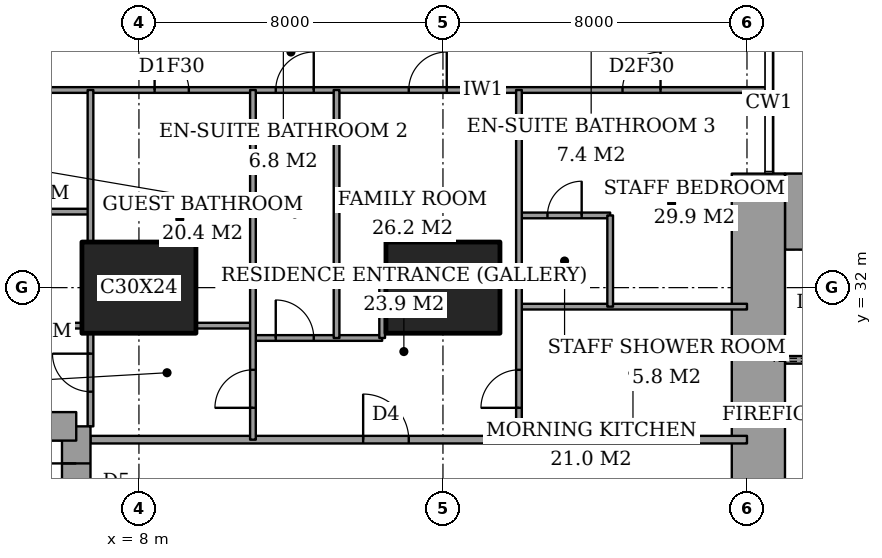
"""IFC4 building model, lengths in metres.
Left out: names, types, materials, properties, quantities, classifications, styles, units other than length and angle.
Written with IfcOpenShell. Run it as: python <this file> out.ifc"""

import sys

from ifc_helpers import new_model, si_unit, direction, frame, frame_2d, origin, origin_2d, place, context, subcontext, project, spatial, rectangle, extrude, element, fill, save


model = new_model("IFC4")
c1 = context("Model", 3, precision=1e-05, world=origin(), true_north=direction((0.0, 1.0)))
c2 = subcontext(c1, "Body", "Model", "MODEL_VIEW")
j1 = project(units=[si_unit("LENGTHUNIT", "METRE"), si_unit("PLANEANGLEUNIT", "RADIAN")], contexts=[c1])
p1 = place(None, origin())
s1 = spatial("IfcSite", under=j1, at=p1, CompositionType="ELEMENT")
p2 = place(p1, origin())
s2 = spatial("IfcBuilding", under=s1, at=p2, CompositionType="ELEMENT")
p3 = place(p2, frame((0.0, 0.0, 125.0)))
s3 = spatial("IfcBuildingStorey", under=s2, at=p3, CompositionType="ELEMENT", Elevation=125.0)
for number, where, z_axis, x_axis in (
    (1, (8.0, 32.0, 0.0), (0.0, 0.0, 1.0), (1.0, 0.0, 0.0)),
    (2, (16.0, 32.0, 0.0), (0.0, 0.0, 1.0), (1.0, 0.0, 0.0)),
):
    element("IfcColumn", number, at=place(p3, frame(where, z_axis=z_axis, x_axis=x_axis)), inside=s3, PredefinedType="COLUMN", context=c2, shape_type="SweptSolid", body=[
        extrude(rectangle(XDim=3.0, YDim=2.4, at=origin_2d()), origin(), (0.0, 0.0, 1.0), 3.6),
    ])
p4 = place(p3, frame((25.0, 34.0, 0.0), z_axis=(0.0, 0.0, 1.0), x_axis=(1.0, 0.0, 0.0)))
e3 = element("IfcWall", 3, at=p4, inside=s3, PredefinedType="SHEAR", context=c2, shape_type="SweptSolid", body=[
    extrude(rectangle(XDim=3.15, YDim=2.0, at=frame_2d((1.575, 0.0))), origin(), (0.0, 0.0, 1.0), 3.6),
])
p5 = place(p3, frame((24.3, 23.15, 0.0), z_axis=(0.0, 0.0, 1.0), x_axis=(0.0, 1.0, 0.0)))
e4 = element("IfcWall", 4, at=p5, inside=s3, PredefinedType="SHEAR", context=c2, shape_type="SweptSolid", body=[
    extrude(rectangle(XDim=11.85, YDim=1.4, at=frame_2d((5.925, 0.0))), origin(), (0.0, 0.0, 1.0), 3.6),
])
p6 = place(p5, frame((0.75, 0.0, 0.0)))
e5 = element("IfcOpeningElement", 5, at=p6, cuts=e4, PredefinedType="OPENING", context=c2, shape_type="SweptSolid", body=[
    extrude(rectangle(XDim=1.8, YDim=2.4, at=frame_2d((0.9, 1.2))), frame((0.0, 0.71, 0.0), z_axis=(0.0, -1.0, 0.0), x_axis=(1.0, 0.0, 0.0)), (0.0, 0.0, 1.0), 1.42),
])
p7 = place(p3, frame((6.35, 19.65, 0.0), z_axis=(0.0, 0.0, 1.0), x_axis=(0.0, 1.0, 0.0)))
e6 = element("IfcWall", 6, at=p7, inside=s3, PredefinedType="SHEAR", context=c2, shape_type="SweptSolid", body=[
    extrude(rectangle(XDim=8.7, YDim=0.75, at=frame_2d((4.35, 0.0))), origin(), (0.0, 0.0, 1.0), 3.6),
])
p8 = place(p7, frame((6.725, 0.0, 0.0)))
e7 = element("IfcOpeningElement", 7, at=p8, cuts=e6, PredefinedType="OPENING", context=c2, shape_type="SweptSolid", body=[
    extrude(rectangle(XDim=1.0, YDim=2.1, at=frame_2d((0.5, 1.05))), frame((0.0, 0.385, 0.0), z_axis=(0.0, -1.0, 0.0), x_axis=(1.0, 0.0, 0.0)), (0.0, 0.0, 1.0), 0.77),
])
p9 = place(p3, frame((6.35, 28.35, 0.0), z_axis=(0.0, 0.0, 1.0), x_axis=(-1.0, 0.0, 0.0)))
e8 = element("IfcWall", 8, at=p9, inside=s3, PredefinedType="SHEAR", context=c2, shape_type="SweptSolid", body=[
    extrude(rectangle(XDim=4.45, YDim=0.75, at=frame_2d((2.225, 0.0))), origin(), (0.0, 0.0, 1.0), 3.6),
])
p10 = place(p3, frame((6.725, 28.0, 0.0), z_axis=(0.0, 0.0, 1.0), x_axis=(1.0, 0.0, 0.0)))
e9 = element("IfcWall", 9, at=p10, inside=s3, PredefinedType="PARTITIONING", context=c2, shape_type="SweptSolid", body=[
    extrude(rectangle(XDim=17.275, YDim=0.2, at=frame_2d((8.637, 0.0))), origin(), (0.0, 0.0, 1.0), 3.35),
])
p11 = place(p10, frame((7.175, 0.0, 0.0)))
e10 = element("IfcOpeningElement", 10, at=p11, cuts=e9, PredefinedType="OPENING", context=c2, shape_type="SweptSolid", body=[
    extrude(rectangle(XDim=1.2, YDim=2.4, at=frame_2d((0.6, 1.2))), frame((0.0, 0.11, 0.0), z_axis=(0.0, -1.0, 0.0), x_axis=(1.0, 0.0, 0.0)), (0.0, 0.0, 1.0), 0.22),
])
p12 = place(p3, frame((11.0, 30.675, 0.0), z_axis=(0.0, 0.0, 1.0), x_axis=(1.0, 0.0, 0.0)))
e11 = element("IfcWall", 11, at=p12, inside=s3, PredefinedType="PARTITIONING", context=c2, shape_type="SweptSolid", body=[
    extrude(rectangle(XDim=3.4, YDim=0.15, at=frame_2d((1.7, 0.0))), origin(), (0.0, 0.0, 1.0), 3.35),
])
p13 = place(p12, frame((0.6, 0.0, 0.0)))
e12 = element("IfcOpeningElement", 12, at=p13, cuts=e11, PredefinedType="OPENING", context=c2, shape_type="SweptSolid", body=[
    extrude(rectangle(XDim=1.0, YDim=2.1, at=frame_2d((0.5, 1.05))), frame((0.0, 0.085, 0.0), z_axis=(0.0, -1.0, 0.0), x_axis=(1.0, 0.0, 0.0)), (0.0, 0.0, 1.0), 0.17),
])
p14 = place(p3, frame((1.35, 31.0, 0.0), z_axis=(0.0, 0.0, 1.0), x_axis=(1.0, 0.0, 0.0)))
e13 = element("IfcWall", 13, at=p14, inside=s3, PredefinedType="PARTITIONING", context=c2, shape_type="SweptSolid", body=[
    extrude(rectangle(XDim=5.15, YDim=0.15, at=frame_2d((2.575, 0.0))), origin(), (0.0, 0.0, 1.0), 3.35),
])
p15 = place(p3, frame((9.5, 31.0, 0.0), z_axis=(0.0, 0.0, 1.0), x_axis=(1.0, 0.0, 0.0)))
e14 = element("IfcWall", 14, at=p15, inside=s3, PredefinedType="PARTITIONING", context=c2, shape_type="SweptSolid", body=[
    extrude(rectangle(XDim=1.5, YDim=0.15, at=frame_2d((0.75, 0.0))), origin(), (0.0, 0.0, 1.0), 3.35),
])
p16 = place(p3, frame((18.0, 31.5, 0.0), z_axis=(0.0, 0.0, 1.0), x_axis=(1.0, 0.0, 0.0)))
e15 = element("IfcWall", 15, at=p16, inside=s3, PredefinedType="PARTITIONING", context=c2, shape_type="SweptSolid", body=[
    extrude(rectangle(XDim=6.0, YDim=0.15, at=frame_2d((3.0, 0.0))), origin(), (0.0, 0.0, 1.0), 3.35),
])
p17 = place(p3, frame((17.5, 32.1, 0.0), z_axis=(0.0, 0.0, 1.0), x_axis=(1.0, 0.0, 0.0)))
e16 = element("IfcWall", 16, at=p17, inside=s3, PredefinedType="PARTITIONING", context=c2, shape_type="SweptSolid", body=[
    extrude(rectangle(XDim=0.5, YDim=0.15, at=frame_2d((0.25, 0.0))), origin(), (0.0, 0.0, 1.0), 2.634),
])
p18 = place(p3, frame((18.0, 33.9, 0.0), z_axis=(0.0, 0.0, 1.0), x_axis=(1.0, 0.0, 0.0)))
e17 = element("IfcWall", 17, at=p18, inside=s3, PredefinedType="PARTITIONING", context=c2, shape_type="SweptSolid", body=[
    extrude(rectangle(XDim=2.4, YDim=0.15, at=frame_2d((1.2, 0.0))), origin(), (0.0, 0.0, 1.0), 3.35),
])
p19 = place(p18, frame((0.75, 0.0, 0.0)))
e18 = element("IfcOpeningElement", 18, at=p19, cuts=e17, PredefinedType="OPENING", context=c2, shape_type="SweptSolid", body=[
    extrude(rectangle(XDim=0.9, YDim=2.1, at=frame_2d((0.45, 1.05))), frame((0.0, 0.085, 0.0), z_axis=(0.0, -1.0, 0.0), x_axis=(1.0, 0.0, 0.0)), (0.0, 0.0, 1.0), 0.17),
])
p20 = place(p3, frame((4.125, 34.0, 0.0), z_axis=(0.0, 0.0, 1.0), x_axis=(1.0, 0.0, 0.0)))
e19 = element("IfcWall", 19, at=p20, inside=s3, PredefinedType="PARTITIONING", context=c2, shape_type="SweptSolid", body=[
    extrude(rectangle(XDim=2.6, YDim=0.15, at=frame_2d((1.3, 0.0))), origin(), (0.0, 0.0, 1.0), 3.35),
])
p21 = place(p3, frame((-0.45, 37.2, 0.0), z_axis=(0.0, 0.0, 1.0), x_axis=(1.0, 0.0, 0.0)))
e20 = element("IfcWall", 20, at=p21, inside=s3, PredefinedType="PARTITIONING", context=c2, shape_type="SweptSolid", body=[
    extrude(rectangle(XDim=25.011, YDim=0.15, at=frame_2d((12.505, 0.0))), origin(), (0.0, 0.0, 1.0), 3.35),
])
p22 = place(p21, frame((12.05, 0.0, 0.0)))
e21 = element("IfcOpeningElement", 21, at=p22, cuts=e20, PredefinedType="OPENING", context=c2, shape_type="SweptSolid", body=[
    extrude(rectangle(XDim=1.0, YDim=2.1, at=frame_2d((0.5, 1.05))), frame((0.0, 0.085, 0.0), z_axis=(0.0, -1.0, 0.0), x_axis=(1.0, 0.0, 0.0)), (0.0, 0.0, 1.0), 0.17),
])
p23 = place(p21, frame((3.087, 0.0, 0.0)))
e22 = element("IfcOpeningElement", 22, at=p23, cuts=e20, PredefinedType="OPENING", context=c2, shape_type="SweptSolid", body=[
    extrude(rectangle(XDim=1.0, YDim=2.1, at=frame_2d((0.5, 1.05))), frame((0.0, 0.085, 0.0), z_axis=(0.0, -1.0, 0.0), x_axis=(1.0, 0.0, 0.0)), (0.0, 0.0, 1.0), 0.17),
])
p24 = place(p21, frame((8.863, 0.0, 0.0)))
e23 = element("IfcOpeningElement", 23, at=p24, cuts=e20, PredefinedType="OPENING", context=c2, shape_type="SweptSolid", body=[
    extrude(rectangle(XDim=0.9, YDim=2.1, at=frame_2d((0.45, 1.05))), frame((0.0, 0.085, 0.0), z_axis=(0.0, -1.0, 0.0), x_axis=(1.0, 0.0, 0.0)), (0.0, 0.0, 1.0), 0.17),
])
p25 = place(p21, frame((15.55, 0.0, 0.0)))
e24 = element("IfcOpeningElement", 24, at=p25, cuts=e20, PredefinedType="OPENING", context=c2, shape_type="SweptSolid", body=[
    extrude(rectangle(XDim=1.0, YDim=2.1, at=frame_2d((0.5, 1.05))), frame((0.0, 0.085, 0.0), z_axis=(0.0, -1.0, 0.0), x_axis=(1.0, 0.0, 0.0)), (0.0, 0.0, 1.0), 0.17),
])
p26 = place(p21, frame((21.175, 0.0, 0.0)))
e25 = element("IfcOpeningElement", 25, at=p26, cuts=e20, PredefinedType="OPENING", context=c2, shape_type="SweptSolid", body=[
    extrude(rectangle(XDim=1.0, YDim=2.1, at=frame_2d((0.5, 1.05))), frame((0.0, 0.085, 0.0), z_axis=(0.0, -1.0, 0.0), x_axis=(1.0, 0.0, 0.0)), (0.0, 0.0, 1.0), 0.17),
])
p27 = place(p3, frame((6.725, 28.35, 0.0), z_axis=(0.0, 0.0, 1.0), x_axis=(0.0, 1.0, 0.0)))
e26 = element("IfcWall", 26, at=p27, inside=s3, PredefinedType="PARTITIONING", context=c2, shape_type="SweptSolid", body=[
    extrude(rectangle(XDim=2.45, YDim=0.15, at=frame_2d((1.225, 0.0))), origin(), (0.0, 0.0, 1.0), 3.35),
])
p28 = place(p27, frame((0.913, 0.0, 0.0)))
e27 = element("IfcOpeningElement", 27, at=p28, cuts=e26, PredefinedType="OPENING", context=c2, shape_type="SweptSolid", body=[
    extrude(rectangle(XDim=1.0, YDim=2.1, at=frame_2d((0.5, 1.05))), frame((0.0, 0.085, 0.0), z_axis=(0.0, -1.0, 0.0), x_axis=(1.0, 0.0, 0.0)), (0.0, 0.0, 1.0), 0.17),
])
p29 = place(p3, frame((6.725, 33.2, 0.0), z_axis=(0.0, 0.0, 1.0), x_axis=(0.0, 1.0, 0.0)))
e28 = element("IfcWall", 28, at=p29, inside=s3, PredefinedType="PARTITIONING", context=c2, shape_type="SweptSolid", body=[
    extrude(rectangle(XDim=4.0, YDim=0.15, at=frame_2d((2.0, 0.0))), origin(), (0.0, 0.0, 1.0), 3.35),
])
p30 = place(p3, frame((11.0, 28.0, 0.0), z_axis=(0.0, 0.0, 1.0), x_axis=(0.0, 1.0, 0.0)))
e29 = element("IfcWall", 29, at=p30, inside=s3, PredefinedType="PARTITIONING", context=c2, shape_type="SweptSolid", body=[
    extrude(rectangle(XDim=9.2, YDim=0.15, at=frame_2d((4.6, 0.0))), origin(), (0.0, 0.0, 1.0), 3.35),
])
p31 = place(p30, frame((0.837, 0.0, 0.0)))
e30 = element("IfcOpeningElement", 30, at=p31, cuts=e29, PredefinedType="OPENING", context=c2, shape_type="SweptSolid", body=[
    extrude(rectangle(XDim=1.0, YDim=2.1, at=frame_2d((0.5, 1.05))), frame((0.0, 0.085, 0.0), z_axis=(0.0, -1.0, 0.0), x_axis=(1.0, 0.0, 0.0)), (0.0, 0.0, 1.0), 0.17),
])
p32 = place(p3, frame((13.2, 30.675, 0.0), z_axis=(0.0, 0.0, 1.0), x_axis=(0.0, 1.0, 0.0)))
e31 = element("IfcWall", 31, at=p32, inside=s3, PredefinedType="PARTITIONING", context=c2, shape_type="SweptSolid", body=[
    extrude(rectangle(XDim=6.525, YDim=0.15, at=frame_2d((3.262, 0.0))), origin(), (0.0, 0.0, 1.0), 3.35),
])
p33 = place(p3, frame((14.4, 30.675, 0.0), z_axis=(0.0, 0.0, 1.0), x_axis=(0.0, 1.0, 0.0)))
e32 = element("IfcWall", 32, at=p33, inside=s3, PredefinedType="PARTITIONING", context=c2, shape_type="SweptSolid", body=[
    extrude(rectangle(XDim=1.425, YDim=0.15, at=frame_2d((0.712, 0.0))), origin(), (0.0, 0.0, 1.0), 3.35),
])
p34 = place(p3, frame((18.0, 28.0, 0.0), z_axis=(0.0, 0.0, 1.0), x_axis=(0.0, 1.0, 0.0)))
e33 = element("IfcWall", 33, at=p34, inside=s3, PredefinedType="PARTITIONING", context=c2, shape_type="SweptSolid", body=[
    extrude(rectangle(XDim=9.2, YDim=0.15, at=frame_2d((4.6, 0.0))), origin(), (0.0, 0.0, 1.0), 3.35),
])
p35 = place(p34, frame((0.837, 0.0, 0.0)))
e34 = element("IfcOpeningElement", 34, at=p35, cuts=e33, PredefinedType="OPENING", context=c2, shape_type="SweptSolid", body=[
    extrude(rectangle(XDim=1.0, YDim=2.1, at=frame_2d((0.5, 1.05))), frame((0.0, 0.085, 0.0), z_axis=(0.0, -1.0, 0.0), x_axis=(1.0, 0.0, 0.0)), (0.0, 0.0, 1.0), 0.17),
])
p36 = place(p3, frame((20.4, 31.5, 0.0), z_axis=(0.0, 0.0, 1.0), x_axis=(0.0, 1.0, 0.0)))
e35 = element("IfcWall", 35, at=p36, inside=s3, PredefinedType="PARTITIONING", context=c2, shape_type="SweptSolid", body=[
    extrude(rectangle(XDim=2.4, YDim=0.15, at=frame_2d((1.2, 0.0))), origin(), (0.0, 0.0, 1.0), 3.35),
])
p37 = place(p3, frame((25.0, 30.1, 0.0), z_axis=(0.0, 0.0, 1.0), x_axis=(1.0, 0.0, 0.0)))
e36 = element("IfcWall", 36, at=p37, inside=s3, PredefinedType="PARTITIONING", context=c2, shape_type="SweptSolid", body=[
    extrude(rectangle(XDim=12.7, YDim=0.2, at=frame_2d((6.35, 0.0))), origin(), (0.0, 0.0, 1.0), 3.6),
])
p38 = place(p37, frame((0.9, 0.0, 0.0)))
e37 = element("IfcOpeningElement", 37, at=p38, cuts=e36, PredefinedType="OPENING", context=c2, shape_type="SweptSolid", body=[
    extrude(rectangle(XDim=1.2, YDim=2.1, at=frame_2d((0.6, 1.05))), frame((0.0, 0.11, 0.0), z_axis=(0.0, -1.0, 0.0), x_axis=(1.0, 0.0, 0.0)), (0.0, 0.0, 1.0), 0.22),
])
p39 = place(p22, origin())
e38 = element("IfcDoor", 38, at=p39, inside=s3, OperationType="SINGLE_SWING_LEFT", PredefinedType="DOOR", context=c2, shape_type="SweptSolid", body=[
    extrude(rectangle(XDim=1.0, YDim=2.1, at=frame_2d((0.5, 1.05))), frame((0.0, 0.025, 0.0), z_axis=(0.0, -1.0, 0.0), x_axis=(1.0, 0.0, 0.0)), (0.0, 0.0, 1.0), 0.05),
])
fill(e21, e38)
p40 = place(p28, origin())
e39 = element("IfcDoor", 39, at=p40, inside=s3, OperationType="SINGLE_SWING_LEFT", PredefinedType="DOOR", context=c2, shape_type="SweptSolid", body=[
    extrude(rectangle(XDim=1.0, YDim=2.1, at=frame_2d((0.5, 1.05))), frame((0.0, 0.025, 0.0), z_axis=(0.0, -1.0, 0.0), x_axis=(1.0, 0.0, 0.0)), (0.0, 0.0, 1.0), 0.05),
])
fill(e27, e39)
p41 = place(p24, origin())
e40 = element("IfcDoor", 40, at=p41, inside=s3, OperationType="SINGLE_SWING_RIGHT", PredefinedType="DOOR", context=c2, shape_type="SweptSolid", body=[
    extrude(rectangle(XDim=0.9, YDim=2.1, at=frame_2d((0.45, 1.05))), frame((0.0, 0.025, 0.0), z_axis=(0.0, -1.0, 0.0), x_axis=(1.0, 0.0, 0.0)), (0.0, 0.0, 1.0), 0.05),
])
fill(e23, e40)
p42 = place(p31, origin())
e41 = element("IfcDoor", 41, at=p42, inside=s3, OperationType="SINGLE_SWING_RIGHT", PredefinedType="DOOR", context=c2, shape_type="SweptSolid", body=[
    extrude(rectangle(XDim=1.0, YDim=2.1, at=frame_2d((0.5, 1.05))), frame((0.0, 0.025, 0.0), z_axis=(0.0, -1.0, 0.0), x_axis=(1.0, 0.0, 0.0)), (0.0, 0.0, 1.0), 0.05),
])
fill(e30, e41)
p43 = place(p11, origin())
e42 = element("IfcDoor", 42, at=p43, inside=s3, OperationType="SINGLE_SWING_RIGHT", PredefinedType="DOOR", context=c2, shape_type="SweptSolid", body=[
    extrude(rectangle(XDim=1.2, YDim=2.4, at=frame_2d((0.6, 1.2))), frame((0.0, 0.025, 0.0), z_axis=(0.0, -1.0, 0.0), x_axis=(1.0, 0.0, 0.0)), (0.0, 0.0, 1.0), 0.05),
])
fill(e10, e42)
p44 = place(p13, origin())
e43 = element("IfcDoor", 43, at=p44, inside=s3, OperationType="SINGLE_SWING_RIGHT", PredefinedType="DOOR", context=c2, shape_type="SweptSolid", body=[
    extrude(rectangle(XDim=1.0, YDim=2.1, at=frame_2d((0.5, 1.05))), frame((0.0, 0.025, 0.0), z_axis=(0.0, -1.0, 0.0), x_axis=(1.0, 0.0, 0.0)), (0.0, 0.0, 1.0), 0.05),
])
fill(e12, e43)
p45 = place(p25, origin())
e44 = element("IfcDoor", 44, at=p45, inside=s3, OperationType="SINGLE_SWING_LEFT", PredefinedType="DOOR", context=c2, shape_type="SweptSolid", body=[
    extrude(rectangle(XDim=1.0, YDim=2.1, at=frame_2d((0.5, 1.05))), frame((0.0, 0.025, 0.0), z_axis=(0.0, -1.0, 0.0), x_axis=(1.0, 0.0, 0.0)), (0.0, 0.0, 1.0), 0.05),
])
fill(e24, e44)
p46 = place(p19, origin())
e45 = element("IfcDoor", 45, at=p46, inside=s3, OperationType="SINGLE_SWING_LEFT", PredefinedType="DOOR", context=c2, shape_type="SweptSolid", body=[
    extrude(rectangle(XDim=0.9, YDim=2.1, at=frame_2d((0.45, 1.05))), frame((0.0, 0.025, 0.0), z_axis=(0.0, -1.0, 0.0), x_axis=(1.0, 0.0, 0.0)), (0.0, 0.0, 1.0), 0.05),
])
fill(e18, e45)
p47 = place(p26, origin())
e46 = element("IfcDoor", 46, at=p47, inside=s3, OperationType="SINGLE_SWING_LEFT", PredefinedType="DOOR", context=c2, shape_type="SweptSolid", body=[
    extrude(rectangle(XDim=1.0, YDim=2.1, at=frame_2d((0.5, 1.05))), frame((0.0, 0.025, 0.0), z_axis=(0.0, -1.0, 0.0), x_axis=(1.0, 0.0, 0.0)), (0.0, 0.0, 1.0), 0.05),
])
fill(e25, e46)
p48 = place(p35, origin())
e47 = element("IfcDoor", 47, at=p48, inside=s3, OperationType="SINGLE_SWING_RIGHT", PredefinedType="DOOR", context=c2, shape_type="SweptSolid", body=[
    extrude(rectangle(XDim=1.0, YDim=2.1, at=frame_2d((0.5, 1.05))), frame((0.0, 0.025, 0.0), z_axis=(0.0, -1.0, 0.0), x_axis=(1.0, 0.0, 0.0)), (0.0, 0.0, 1.0), 0.05),
])
fill(e34, e47)
p49 = place(p8, origin())
e48 = element("IfcDoor", 48, at=p49, inside=s3, OperationType="SINGLE_SWING_LEFT", PredefinedType="DOOR", context=c2, shape_type="SweptSolid", body=[
    extrude(rectangle(XDim=1.0, YDim=2.1, at=frame_2d((0.5, 1.05))), frame((0.0, 0.025, 0.0), z_axis=(0.0, -1.0, 0.0), x_axis=(1.0, 0.0, 0.0)), (0.0, 0.0, 1.0), 0.05),
])
fill(e7, e48)
save(model, sys.argv[1])
